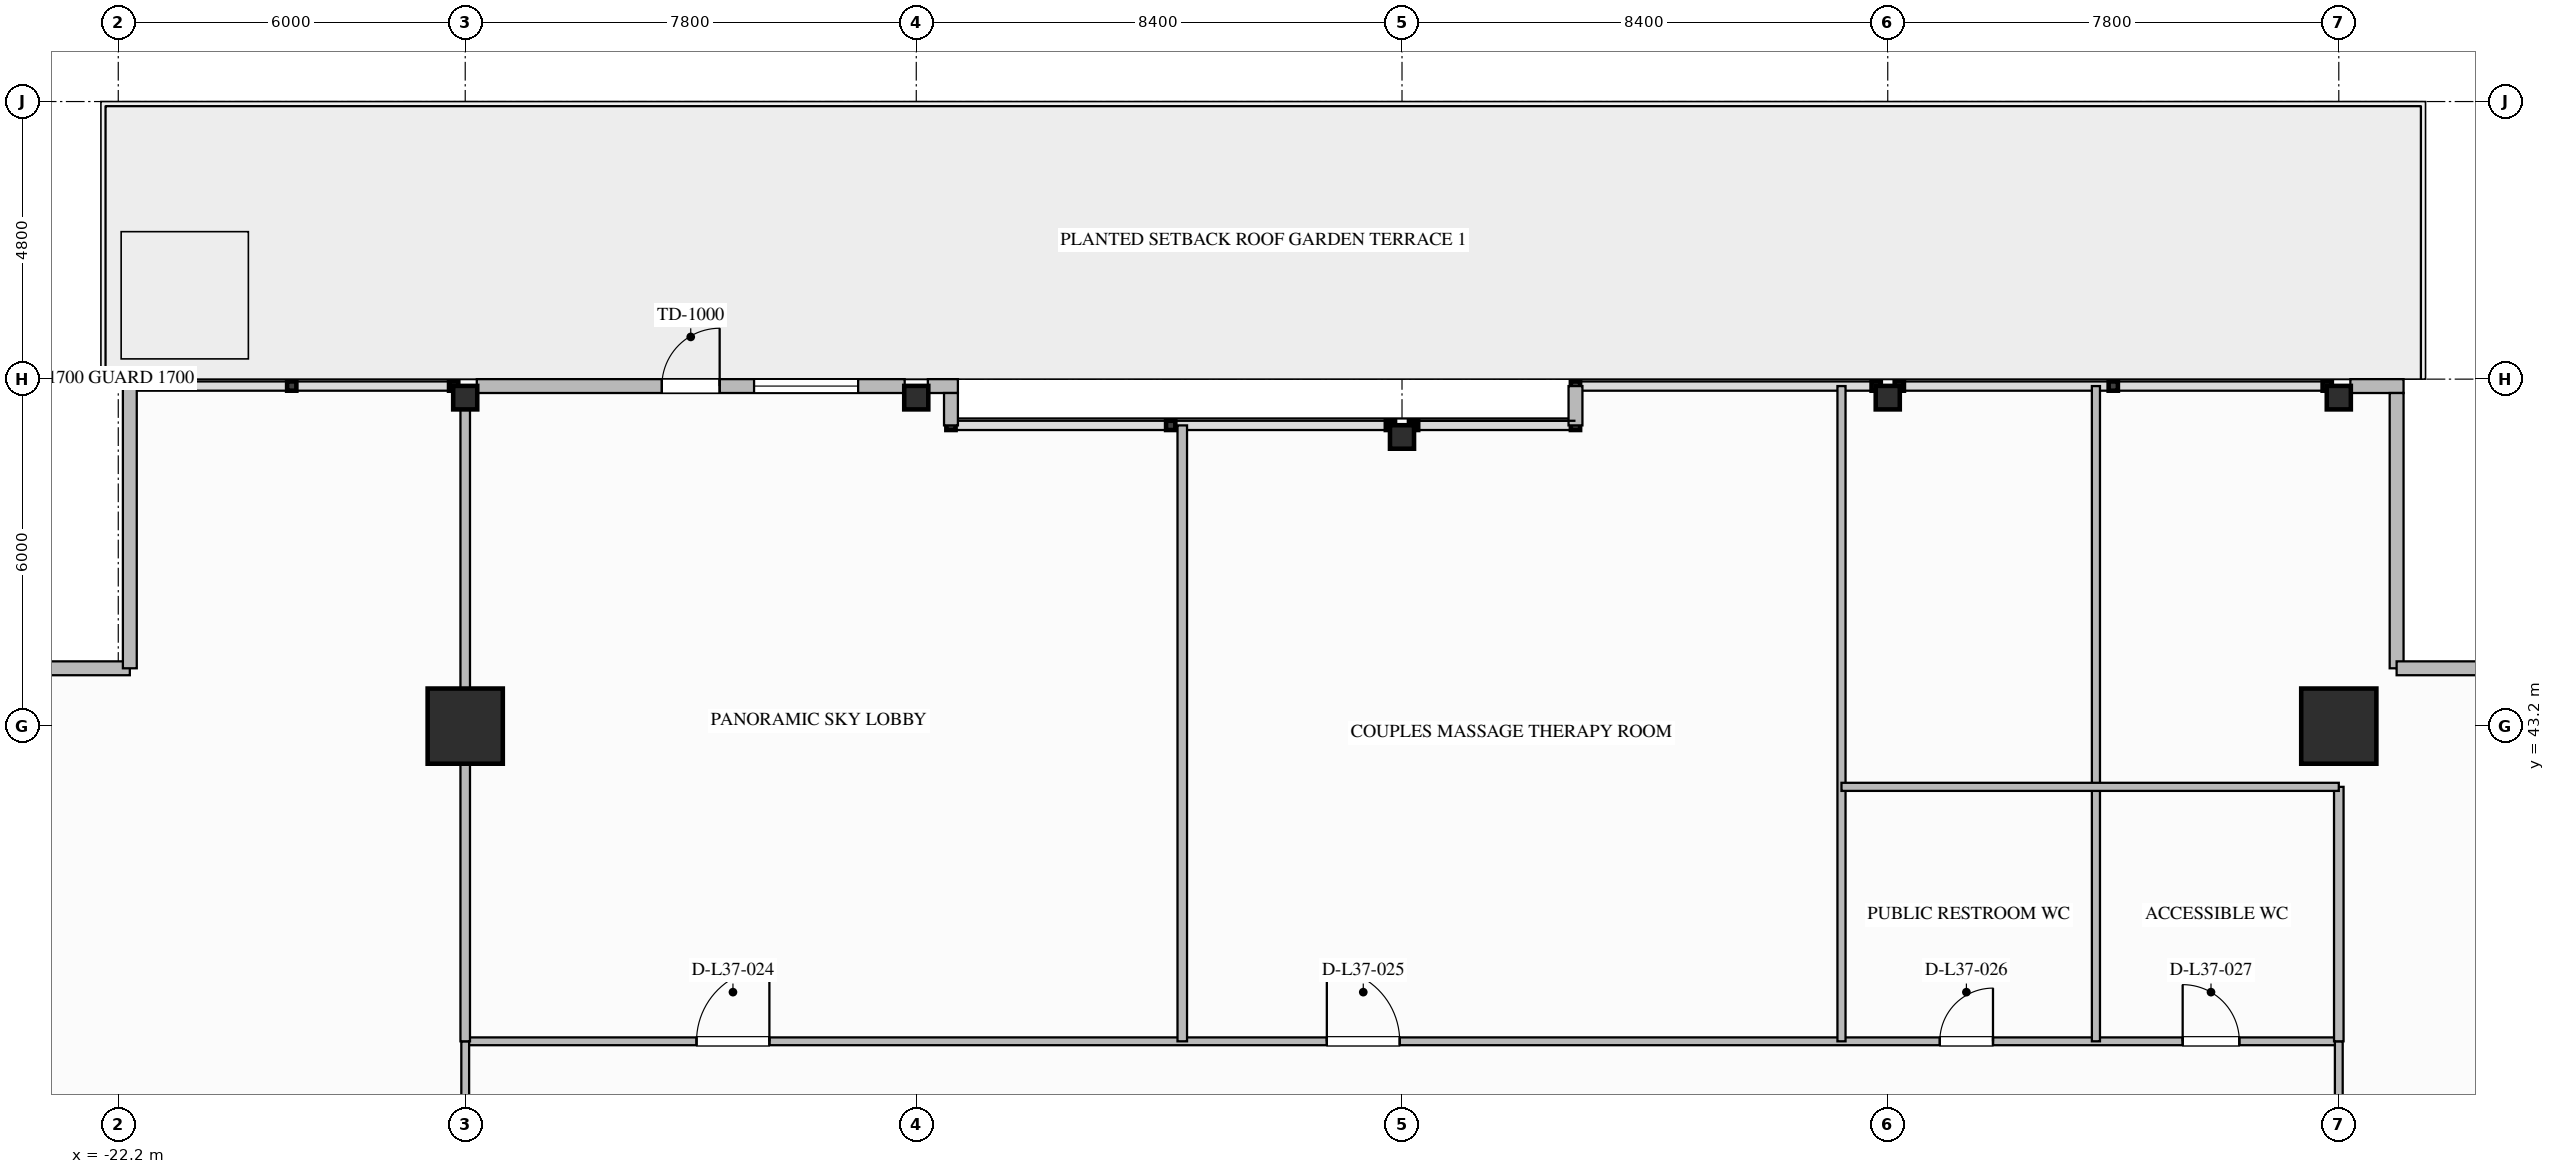
"""IFC4 building model, lengths in metres.
Left out: names, types, materials, properties, quantities, classifications, styles, units other than length and angle.
Written with IfcOpenShell. Run it as: python <this file> out.ifc"""

import sys

from ifc_helpers import new_model, si_unit, direction, frame, frame_2d, origin, origin_2d, place, context, subcontext, project, spatial, rectangle, i_section, extrude, element, fill, save


model = new_model("IFC4")
c1 = context("Model", 3, precision=1e-05, world=origin(), true_north=direction((0.0, 1.0)))
c2 = subcontext(c1, "Body", "Model", "MODEL_VIEW")
j1 = project(units=[si_unit("LENGTHUNIT", "METRE"), si_unit("PLANEANGLEUNIT", "RADIAN")], contexts=[c1])
p1 = place(None, origin())
s1 = spatial("IfcSite", under=j1, at=p1, CompositionType="ELEMENT")
p2 = place(p1, origin())
s2 = spatial("IfcBuilding", under=s1, at=p2, CompositionType="ELEMENT")
p3 = place(p2, frame((0.0, 0.0, 145.8)))
s3 = spatial("IfcBuildingStorey", under=s2, at=p3, CompositionType="ELEMENT", Elevation=145.8)
for number, where, z_axis, x_axis in (
    (1, (-16.2, 43.2, 0.0), (0.0, 0.0, 1.0), (1.0, 0.0, 0.0)),
    (2, (16.2, 43.2, 0.0), (0.0, 0.0, 1.0), (1.0, 0.0, 0.0)),
):
    element("IfcColumn", number, at=place(p3, frame(where, z_axis=z_axis, x_axis=x_axis)), inside=s3, PredefinedType="COLUMN", context=c2, shape_type="SweptSolid", body=[
        extrude(rectangle(XDim=1.3, YDim=1.3, at=origin_2d()), origin(), (0.0, 0.0, 1.0), 4.6),
    ])
for number, where, z_axis, x_axis in (
    (3, (-16.2, 48.88, -0.3), (0.0, 0.0, 1.0), (0.0, 1.0, 0.0)),
    (4, (-8.4, 48.88, -0.3), (0.0, 0.0, 1.0), (0.0, 1.0, 0.0)),
    (5, (0.0, 48.2, -0.3), (0.0, 0.0, 1.0), (0.0, 1.0, 0.0)),
    (6, (8.4, 48.88, -0.3), (0.0, 0.0, 1.0), (0.0, 1.0, 0.0)),
    (7, (16.2, 48.88, -0.3), (0.0, 0.0, 1.0), (0.0, 1.0, 0.0)),
):
    element("IfcColumn", number, at=place(p3, frame(where, z_axis=z_axis, x_axis=x_axis)), inside=s3, PredefinedType="COLUMN", context=c2, shape_type="SweptSolid", body=[
        extrude(i_section(OverallWidth=0.406, OverallDepth=0.416, WebThickness=0.03, FlangeThickness=0.048, FilletRadius=0.028, at=origin_2d()), origin(), (0.0, 0.0, 1.0), 4.897),
    ])
p4 = place(p3, frame((-16.0, 49.08, 0.0), z_axis=(0.0, 0.0, 1.0), x_axis=(1.0, 0.0, 0.0)))
e8 = element("IfcWall", 8, at=p4, inside=s3, PredefinedType="STANDARD", context=c2, shape_type="SweptSolid", body=[
    extrude(rectangle(XDim=7.4, YDim=0.24, at=frame_2d((3.7, 0.0))), origin(), (0.0, 0.0, 1.0), 3.803),
])
p5 = place(p4, frame((3.2, 0.0, 0.0)))
e9 = element("IfcOpeningElement", 9, at=p5, cuts=e8, PredefinedType="OPENING", context=c2, shape_type="SweptSolid", body=[
    extrude(rectangle(XDim=1.0, YDim=2.2, at=frame_2d((0.5, 1.1))), frame((0.0, 0.13, 0.0), z_axis=(0.0, -1.0, 0.0), x_axis=(1.0, 0.0, 0.0)), (0.0, 0.0, 1.0), 0.26),
])
p6 = place(p4, frame((4.795, 0.0, 0.75)))
e10 = element("IfcOpeningElement", 10, at=p6, cuts=e8, PredefinedType="OPENING", context=c2, shape_type="SweptSolid", body=[
    extrude(rectangle(XDim=1.8, YDim=2.05, at=frame_2d((0.9, 1.025))), frame((0.0, 0.13, 0.0), z_axis=(0.0, -1.0, 0.0), x_axis=(1.0, 0.0, 0.0)), (0.0, 0.0, 1.0), 0.26),
])
p7 = place(p3, frame((-8.2, 49.08, 0.0), z_axis=(0.0, 0.0, 1.0), x_axis=(1.0, 0.0, 0.0)))
e11 = element("IfcWall", 11, at=p7, inside=s3, PredefinedType="STANDARD", context=c2, shape_type="SweptSolid", body=[
    extrude(rectangle(XDim=0.52, YDim=0.24, at=frame_2d((0.26, 0.0))), origin(), (0.0, 0.0, 1.0), 4.34),
])
p8 = place(p3, frame((16.4, 49.08, 0.0), z_axis=(0.0, 0.0, 1.0), x_axis=(1.0, 0.0, 0.0)))
e12 = element("IfcWall", 12, at=p8, inside=s3, PredefinedType="STANDARD", context=c2, shape_type="SweptSolid", body=[
    extrude(rectangle(XDim=0.92, YDim=0.24, at=frame_2d((0.46, 0.0))), origin(), (0.0, 0.0, 1.0), 4.34),
])
p9 = place(p3, frame((-26.76, 44.2, 0.0), z_axis=(0.0, 0.0, 1.0), x_axis=(1.0, 0.0, 0.0)))
e13 = element("IfcWall", 13, at=p9, inside=s3, PredefinedType="STANDARD", context=c2, shape_type="SweptSolid", body=[
    extrude(rectangle(XDim=4.76, YDim=0.24, at=frame_2d((2.38, 0.0))), origin(), (0.0, 0.0, 1.0), 4.34),
])
p10 = place(p3, frame((-22.0, 44.2, 0.0), z_axis=(0.0, 0.0, 1.0), x_axis=(0.0, 1.0, 0.0)))
e14 = element("IfcWall", 14, at=p10, inside=s3, PredefinedType="STANDARD", context=c2, shape_type="SweptSolid", body=[
    extrude(rectangle(XDim=4.88, YDim=0.24, at=frame_2d((2.44, 0.0))), origin(), (0.0, 0.0, 1.0), 4.34),
])
for number, where, z_axis, x_axis in (
    (15, (17.2, 48.96, 0.0), (0.0, 0.0, 1.0), (0.0, -1.0, 0.0)),
    (16, (17.2, 44.2, 0.0), (0.0, 0.0, 1.0), (1.0, 0.0, 0.0)),
):
    element("IfcWall", number, at=place(p3, frame(where, z_axis=z_axis, x_axis=x_axis)), inside=s3, PredefinedType="STANDARD", context=c2, shape_type="SweptSolid", body=[
        extrude(rectangle(XDim=4.76, YDim=0.24, at=frame_2d((2.38, 0.0))), origin(), (0.0, 0.0, 1.0), 4.34),
    ])
p11 = place(p3, frame((-7.8, 48.96, 0.0), z_axis=(0.0, 0.0, 1.0), x_axis=(0.0, -1.0, 0.0)))
e17 = element("IfcWall", 17, at=p11, inside=s3, PredefinedType="STANDARD", context=c2, shape_type="SweptSolid", body=[
    extrude(rectangle(XDim=0.56, YDim=0.24, at=frame_2d((0.28, 0.0))), origin(), (0.0, 0.0, 1.0), 4.34),
])
p12 = place(p3, frame((3.0, 48.4, 0.0), z_axis=(0.0, 0.0, 1.0), x_axis=(0.0, 1.0, 0.0)))
e18 = element("IfcWall", 18, at=p12, inside=s3, PredefinedType="STANDARD", context=c2, shape_type="SweptSolid", body=[
    extrude(rectangle(XDim=0.68, YDim=0.24, at=frame_2d((0.34, 0.0))), origin(), (0.0, 0.0, 1.0), 4.34),
])
p13 = place(p3, frame((-16.2, 37.75, 0.0), z_axis=(0.0, 0.0, 1.0), x_axis=(1.0, 0.0, 0.0)))
e19 = element("IfcWall", 19, at=p13, inside=s3, PredefinedType="PARTITIONING", context=c2, shape_type="SweptSolid", body=[
    extrude(rectangle(XDim=32.4, YDim=0.135, at=frame_2d((16.2, 0.0))), origin(), (0.0, 0.0, 1.0), 4.34),
])
p14 = place(p13, frame((4.0, 0.0, 0.0)))
e20 = element("IfcOpeningElement", 20, at=p14, cuts=e19, PredefinedType="OPENING", context=c2, shape_type="SweptSolid", body=[
    extrude(rectangle(XDim=1.26, YDim=2.2, at=frame_2d((0.63, 1.1))), frame((0.0, 0.077, 0.0), z_axis=(0.0, -1.0, 0.0), x_axis=(1.0, 0.0, 0.0)), (0.0, 0.0, 1.0), 0.155),
])
p15 = place(p13, frame((14.9, 0.0, 0.0)))
e21 = element("IfcOpeningElement", 21, at=p15, cuts=e19, PredefinedType="OPENING", context=c2, shape_type="SweptSolid", body=[
    extrude(rectangle(XDim=1.26, YDim=2.2, at=frame_2d((0.63, 1.1))), frame((0.0, 0.077, 0.0), z_axis=(0.0, -1.0, 0.0), x_axis=(1.0, 0.0, 0.0)), (0.0, 0.0, 1.0), 0.155),
])
p16 = place(p13, frame((25.5, 0.0, 0.0)))
e22 = element("IfcOpeningElement", 22, at=p16, cuts=e19, PredefinedType="OPENING", context=c2, shape_type="SweptSolid", body=[
    extrude(rectangle(XDim=0.92, YDim=2.1, at=frame_2d((0.46, 1.05))), frame((0.0, 0.077, 0.0), z_axis=(0.0, -1.0, 0.0), x_axis=(1.0, 0.0, 0.0)), (0.0, 0.0, 1.0), 0.155),
])
p17 = place(p13, frame((29.7, 0.0, 0.0)))
e23 = element("IfcOpeningElement", 23, at=p17, cuts=e19, PredefinedType="OPENING", context=c2, shape_type="SweptSolid", body=[
    extrude(rectangle(XDim=0.98, YDim=2.1, at=frame_2d((0.49, 1.05))), frame((0.0, 0.077, 0.0), z_axis=(0.0, -1.0, 0.0), x_axis=(1.0, 0.0, 0.0)), (0.0, 0.0, 1.0), 0.155),
])
for number, where, z_axis, x_axis in (
    (24, (-16.2, 35.6, 0.0), (0.0, 0.0, 1.0), (0.0, 1.0, 0.0)),
    (25, (16.2, 35.6, 0.0), (0.0, 0.0, 1.0), (0.0, 1.0, 0.0)),
):
    element("IfcWall", number, at=place(p3, frame(where, z_axis=z_axis, x_axis=x_axis)), inside=s3, PredefinedType="PARTITIONING", context=c2, shape_type="SweptSolid", body=[
        extrude(rectangle(XDim=2.15, YDim=0.135, at=frame_2d((1.075, 0.0))), origin(), (0.0, 0.0, 1.0), 3.629),
    ])
p18 = place(p3, frame((-16.2, 37.75, 0.0), z_axis=(0.0, 0.0, 1.0), x_axis=(0.0, 1.0, 0.0)))
e26 = element("IfcWall", 26, at=p18, inside=s3, PredefinedType="PARTITIONING", context=c2, shape_type="SweptSolid", body=[
    extrude(rectangle(XDim=11.33, YDim=0.165, at=frame_2d((5.665, 0.0))), origin(), (0.0, 0.0, 1.0), 3.629),
])
p19 = place(p3, frame((16.2, 37.75, 0.0), z_axis=(0.0, 0.0, 1.0), x_axis=(0.0, 1.0, 0.0)))
e27 = element("IfcWall", 27, at=p19, inside=s3, PredefinedType="PARTITIONING", context=c2, shape_type="SweptSolid", body=[
    extrude(rectangle(XDim=4.4, YDim=0.165, at=frame_2d((2.2, 0.0))), origin(), (0.0, 0.0, 1.0), 3.629),
])
p20 = place(p3, frame((-3.8, 37.75, 0.0), z_axis=(0.0, 0.0, 1.0), x_axis=(0.0, 1.0, 0.0)))
e28 = element("IfcWall", 28, at=p20, inside=s3, PredefinedType="PARTITIONING", context=c2, shape_type="SweptSolid", body=[
    extrude(rectangle(XDim=10.65, YDim=0.165, at=frame_2d((5.325, 0.0))), origin(), (0.0, 0.0, 1.0), 4.34),
])
for number, where, z_axis, x_axis in (
    (29, (7.6, 37.75, 0.0), (0.0, 0.0, 1.0), (0.0, 1.0, 0.0)),
    (30, (12.0, 37.75, 0.0), (0.0, 0.0, 1.0), (0.0, 1.0, 0.0)),
):
    element("IfcWall", number, at=place(p3, frame(where, z_axis=z_axis, x_axis=x_axis)), inside=s3, PredefinedType="PLUMBINGWALL", context=c2, shape_type="SweptSolid", body=[
        extrude(rectangle(XDim=11.33, YDim=0.14, at=frame_2d((5.665, 0.0))), origin(), (0.0, 0.0, 1.0), 4.34),
    ])
p21 = place(p3, frame((7.6, 42.15, 0.0), z_axis=(0.0, 0.0, 1.0), x_axis=(1.0, 0.0, 0.0)))
e31 = element("IfcWall", 31, at=p21, inside=s3, PredefinedType="PLUMBINGWALL", context=c2, shape_type="SweptSolid", body=[
    extrude(rectangle(XDim=8.6, YDim=0.14, at=frame_2d((4.3, 0.0))), origin(), (0.0, 0.0, 1.0), 4.34),
])
p22 = place(p5, origin())
e32 = element("IfcDoor", 32, at=p22, inside=s3, OperationType="SINGLE_SWING_RIGHT", PredefinedType="DOOR", context=c2, shape_type="SweptSolid", body=[
    extrude(rectangle(XDim=1.0, YDim=2.2, at=frame_2d((0.5, 1.1))), frame((0.0, 0.025, 0.0), z_axis=(0.0, -1.0, 0.0), x_axis=(1.0, 0.0, 0.0)), (0.0, 0.0, 1.0), 0.05),
])
fill(e9, e32)
p23 = place(p6, origin())
e33 = element("IfcWindow", 33, at=p23, inside=s3, PartitioningType="SINGLE_PANEL", PredefinedType="WINDOW", context=c2, shape_type="SweptSolid", body=[
    extrude(rectangle(XDim=1.8, YDim=2.05, at=frame_2d((0.9, 1.025))), frame((0.0, 0.03, 0.0), z_axis=(0.0, -1.0, 0.0), x_axis=(1.0, 0.0, 0.0)), (0.0, 0.0, 1.0), 0.06),
])
fill(e10, e33)
p24 = place(p14, origin())
e34 = element("IfcDoor", 34, at=p24, inside=s3, OperationType="SINGLE_SWING_RIGHT", PredefinedType="DOOR", context=c2, shape_type="SweptSolid", body=[
    extrude(rectangle(XDim=1.26, YDim=2.2, at=frame_2d((0.63, 1.1))), frame((0.0, 0.025, 0.0), z_axis=(0.0, -1.0, 0.0), x_axis=(1.0, 0.0, 0.0)), (0.0, 0.0, 1.0), 0.05),
])
fill(e20, e34)
p25 = place(p15, origin())
e35 = element("IfcDoor", 35, at=p25, inside=s3, OperationType="SINGLE_SWING_LEFT", PredefinedType="DOOR", context=c2, shape_type="SweptSolid", body=[
    extrude(rectangle(XDim=1.26, YDim=2.2, at=frame_2d((0.63, 1.1))), frame((0.0, 0.025, 0.0), z_axis=(0.0, -1.0, 0.0), x_axis=(1.0, 0.0, 0.0)), (0.0, 0.0, 1.0), 0.05),
])
fill(e21, e35)
p26 = place(p16, origin())
e36 = element("IfcDoor", 36, at=p26, inside=s3, OperationType="SINGLE_SWING_RIGHT", PredefinedType="DOOR", context=c2, shape_type="SweptSolid", body=[
    extrude(rectangle(XDim=0.92, YDim=2.1, at=frame_2d((0.46, 1.05))), frame((0.0, 0.025, 0.0), z_axis=(0.0, -1.0, 0.0), x_axis=(1.0, 0.0, 0.0)), (0.0, 0.0, 1.0), 0.05),
])
fill(e22, e36)
p27 = place(p17, origin())
e37 = element("IfcDoor", 37, at=p27, inside=s3, OperationType="SINGLE_SWING_LEFT", PredefinedType="DOOR", context=c2, shape_type="SweptSolid", body=[
    extrude(rectangle(XDim=0.98, YDim=2.1, at=frame_2d((0.49, 1.05))), frame((0.0, 0.025, 0.0), z_axis=(0.0, -1.0, 0.0), x_axis=(1.0, 0.0, 0.0)), (0.0, 0.0, 1.0), 0.05),
])
fill(e23, e37)
save(model, sys.argv[1])
